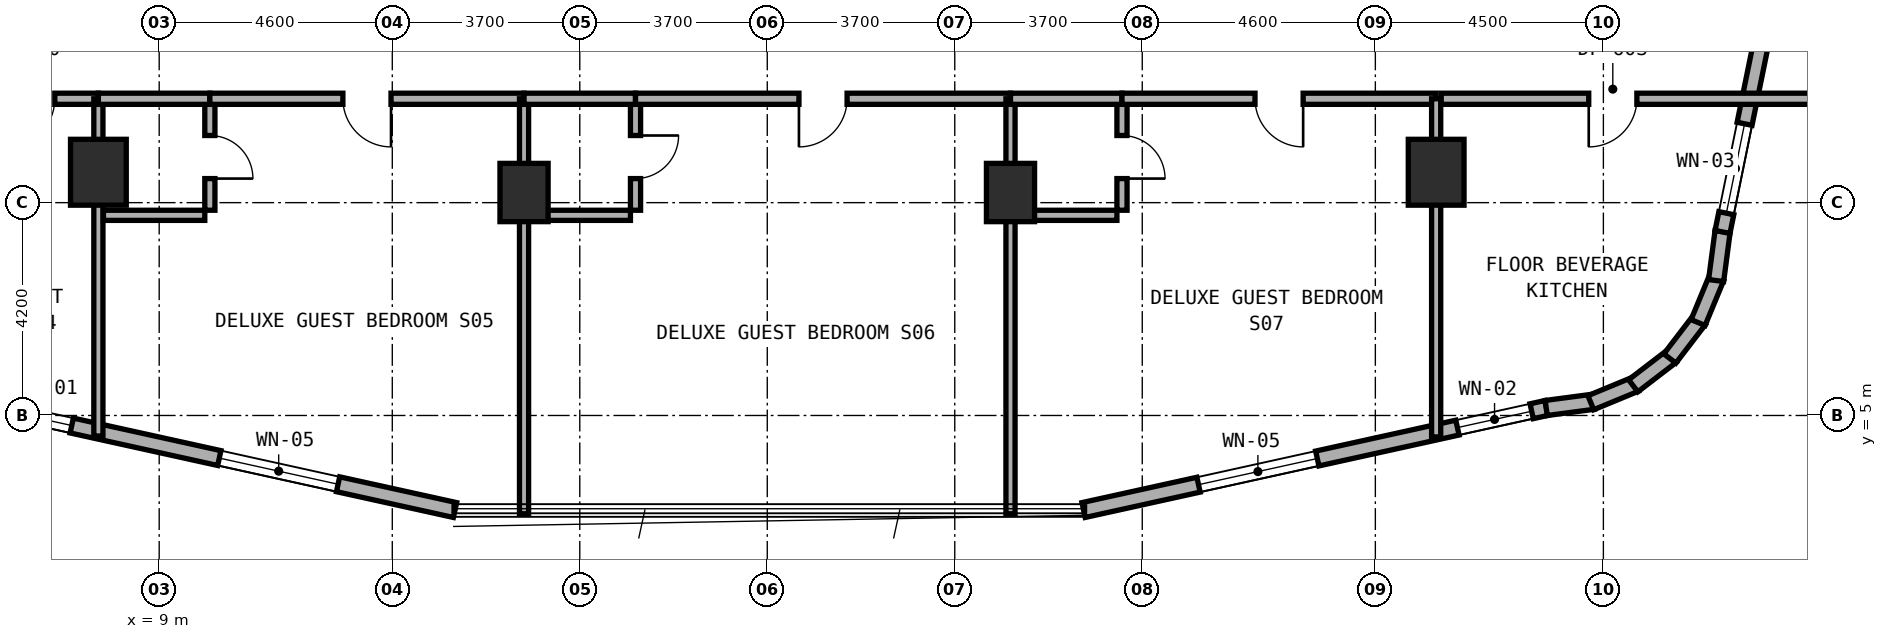
"""IFC4 building model, lengths in metres.
Left out: names, types, materials, properties, quantities, classifications, styles, units other than length and angle.
Written with IfcOpenShell. Run it as: python <this file> out.ifc"""

import sys

from ifc_helpers import new_model, si_unit, direction, frame, frame_2d, origin, origin_2d, place, context, subcontext, project, spatial, rectangle, extrude, element, fill, save


model = new_model("IFC4")
c1 = context("Model", 3, precision=1e-05, world=origin(), true_north=direction((0.0, 1.0)))
c2 = subcontext(c1, "Body", "Model", "MODEL_VIEW")
j1 = project(units=[si_unit("LENGTHUNIT", "METRE"), si_unit("PLANEANGLEUNIT", "RADIAN")], contexts=[c1])
p1 = place(None, origin())
s1 = spatial("IfcSite", under=j1, at=p1, CompositionType="ELEMENT")
p2 = place(p1, origin())
s2 = spatial("IfcBuilding", under=s1, at=p2, CompositionType="ELEMENT")
p3 = place(p2, frame((0.0, 0.0, 31.0)))
s3 = spatial("IfcBuildingStorey", under=s2, at=p3, CompositionType="ELEMENT", Elevation=31.0)
for number, where, z_axis, x_axis in (
    (1, (16.2, 9.4, 0.0), (0.0, 0.0, 1.0), (1.0, 0.0, 0.0)),
    (2, (25.8, 9.4, 0.0), (0.0, 0.0, 1.0), (1.0, 0.0, 0.0)),
):
    element("IfcColumn", number, at=place(p3, frame(where, z_axis=z_axis, x_axis=x_axis)), inside=s3, PredefinedType="COLUMN", context=c2, shape_type="SweptSolid", body=[
        extrude(rectangle(XDim=0.95, YDim=1.15, at=origin_2d()), origin(), (0.0, 0.0, 1.0), 3.5),
    ])
for number, where, z_axis, x_axis in (
    (3, (7.8, 9.8, 0.0), (0.0, 0.0, 1.0), (1.0, 0.0, 0.0)),
    (4, (34.2, 9.8, 0.0), (0.0, 0.0, 1.0), (1.0, 0.0, 0.0)),
):
    element("IfcColumn", number, at=place(p3, frame(where, z_axis=z_axis, x_axis=x_axis)), inside=s3, PredefinedType="COLUMN", context=c2, shape_type="SweptSolid", body=[
        extrude(rectangle(XDim=1.1, YDim=1.3, at=origin_2d()), origin(), (0.0, 0.0, 1.0), 3.5),
    ])
p4 = place(p3, frame((5.704, 5.148, 0.0), z_axis=(0.0, 0.0, 1.0), x_axis=(0.9765437942, -0.215318875183, 0.0)))
e5 = element("IfcWall", 5, at=p4, inside=s3, PredefinedType="STANDARD", context=c2, shape_type="SweptSolid", body=[
    extrude(rectangle(XDim=9.353, YDim=0.3, at=frame_2d((4.677, 0.0))), origin(), (0.0, 0.0, 1.0), 3.22),
])
p5 = place(p4, frame((0.408, 0.0, 0.85)))
e6 = element("IfcOpeningElement", 6, at=p5, cuts=e5, PredefinedType="OPENING", context=c2, shape_type="SweptSolid", body=[
    extrude(rectangle(XDim=1.2, YDim=1.5, at=frame_2d((0.6, 0.75))), frame((0.0, 0.16, 0.0), z_axis=(0.0, -1.0, 0.0), x_axis=(1.0, 0.0, 0.0)), (0.0, 0.0, 1.0), 0.32),
])
p6 = place(p4, frame((4.59, 0.0, 0.8)))
e7 = element("IfcOpeningElement", 7, at=p6, cuts=e5, PredefinedType="OPENING", context=c2, shape_type="SweptSolid", body=[
    extrude(rectangle(XDim=2.4, YDim=1.6, at=frame_2d((1.2, 0.8))), frame((0.0, 0.16, 0.0), z_axis=(0.0, -1.0, 0.0), x_axis=(1.0, 0.0, 0.0)), (0.0, 0.0, 1.0), 0.32),
])
p7 = place(p3, frame((27.242, 3.134, 0.0), z_axis=(0.0, 0.0, 1.0), x_axis=(0.97654500432, 0.215313386808, 0.0)))
e8 = element("IfcWall", 8, at=p7, inside=s3, PredefinedType="STANDARD", context=c2, shape_type="SweptSolid", body=[
    extrude(rectangle(XDim=9.354, YDim=0.3, at=frame_2d((4.677, 0.0))), origin(), (0.0, 0.0, 1.0), 3.22),
])
p8 = place(p7, frame((2.323, 0.0, 0.8)))
e9 = element("IfcOpeningElement", 9, at=p8, cuts=e8, PredefinedType="OPENING", context=c2, shape_type="SweptSolid", body=[
    extrude(rectangle(XDim=2.4, YDim=1.6, at=frame_2d((1.2, 0.8))), frame((0.0, 0.16, 0.0), z_axis=(0.0, -1.0, 0.0), x_axis=(1.0, 0.0, 0.0)), (0.0, 0.0, 1.0), 0.32),
])
p9 = place(p7, frame((7.555, 0.0, 0.85)))
e10 = element("IfcOpeningElement", 10, at=p9, cuts=e8, PredefinedType="OPENING", context=c2, shape_type="SweptSolid", body=[
    extrude(rectangle(XDim=1.5, YDim=1.5, at=frame_2d((0.75, 0.75))), frame((0.0, 0.16, 0.0), z_axis=(0.0, -1.0, 0.0), x_axis=(1.0, 0.0, 0.0)), (0.0, 0.0, 1.0), 0.32),
])
p10 = place(p3, frame((36.372, 5.148, 0.0), z_axis=(0.0, 0.0, 1.0), x_axis=(0.991359246108, 0.131174864804, 0.0)))
e11 = element("IfcWall", 11, at=p10, inside=s3, PredefinedType="STANDARD", context=c2, shape_type="SweptSolid", body=[
    extrude(rectangle(XDim=0.938, YDim=0.3, at=frame_2d((0.469, 0.0))), origin(), (0.0, 0.0, 1.0), 3.22),
])
p11 = place(p3, frame((37.252, 5.252, 0.0), z_axis=(0.0, 0.0, 1.0), x_axis=(0.924019948111, 0.382344263057, 0.0)))
e12 = element("IfcWall", 12, at=p11, inside=s3, PredefinedType="STANDARD", context=c2, shape_type="SweptSolid", body=[
    extrude(rectangle(XDim=0.955, YDim=0.3, at=frame_2d((0.477, 0.0))), origin(), (0.0, 0.0, 1.0), 3.22),
])
p12 = place(p3, frame((38.089, 5.586, 0.0), z_axis=(0.0, 0.0, 1.0), x_axis=(0.793573440799, 0.608474481025, 0.0)))
e13 = element("IfcWall", 13, at=p12, inside=s3, PredefinedType="STANDARD", context=c2, shape_type="SweptSolid", body=[
    extrude(rectangle(XDim=0.955, YDim=0.3, at=frame_2d((0.478, 0.0))), origin(), (0.0, 0.0, 1.0), 3.22),
])
p13 = place(p3, frame((38.812, 6.125, 0.0), z_axis=(0.0, 0.0, 1.0), x_axis=(0.608351047625, 0.793668068435, 0.0)))
e14 = element("IfcWall", 14, at=p13, inside=s3, PredefinedType="STANDARD", context=c2, shape_type="SweptSolid", body=[
    extrude(rectangle(XDim=0.955, YDim=0.3, at=frame_2d((0.478, 0.0))), origin(), (0.0, 0.0, 1.0), 3.22),
])
p14 = place(p3, frame((39.369, 6.834, 0.0), z_axis=(0.0, 0.0, 1.0), x_axis=(0.382344263057, 0.924019948111, 0.0)))
e15 = element("IfcWall", 15, at=p14, inside=s3, PredefinedType="STANDARD", context=c2, shape_type="SweptSolid", body=[
    extrude(rectangle(XDim=0.955, YDim=0.3, at=frame_2d((0.477, 0.0))), origin(), (0.0, 0.0, 1.0), 3.22),
])
p15 = place(p3, frame((39.725, 7.663, 0.0), z_axis=(0.0, 0.0, 1.0), x_axis=(0.130454512571, 0.991454295543, 0.0)))
e16 = element("IfcWall", 16, at=p15, inside=s3, PredefinedType="STANDARD", context=c2, shape_type="SweptSolid", body=[
    extrude(rectangle(XDim=0.973, YDim=0.3, at=frame_2d((0.487, 0.0))), origin(), (0.0, 0.0, 1.0), 3.22),
])
p16 = place(p3, frame((39.851, 8.622, 0.0), z_axis=(0.0, 0.0, 1.0), x_axis=(0.199990901713, 0.979797754249, 0.0)))
e17 = element("IfcWall", 17, at=p16, inside=s3, PredefinedType="STANDARD", context=c2, shape_type="SweptSolid", body=[
    extrude(rectangle(XDim=10.065, YDim=0.3, at=frame_2d((5.033, 0.0))), origin(), (0.0, 0.0, 1.0), 3.22),
])
p17 = place(p16, frame((0.378, 0.0, 0.85)))
e18 = element("IfcOpeningElement", 18, at=p17, cuts=e17, PredefinedType="OPENING", context=c2, shape_type="SweptSolid", body=[
    extrude(rectangle(XDim=1.8, YDim=1.5, at=frame_2d((0.9, 0.75))), frame((0.0, 0.16, 0.0), z_axis=(0.0, -1.0, 0.0), x_axis=(1.0, 0.0, 0.0)), (0.0, 0.0, 1.0), 0.32),
])
p18 = place(p16, frame((5.236, 0.0, 0.8)))
e19 = element("IfcOpeningElement", 19, at=p18, cuts=e17, PredefinedType="OPENING", context=c2, shape_type="SweptSolid", body=[
    extrude(rectangle(XDim=2.4, YDim=1.6, at=frame_2d((1.2, 0.8))), frame((0.0, 0.16, 0.0), z_axis=(0.0, -1.0, 0.0), x_axis=(1.0, 0.0, 0.0)), (0.0, 0.0, 1.0), 0.32),
])
p19 = place(p3, frame((5.55, 11.25, 0.0), z_axis=(0.0, 0.0, 1.0), x_axis=(1.0, 0.0, 0.0)))
e20 = element("IfcWall", 20, at=p19, inside=s3, PredefinedType="SOLIDWALL", context=c2, shape_type="SweptSolid", body=[
    extrude(rectangle(XDim=2.25, YDim=0.22, at=frame_2d((1.125, 0.0))), origin(), (0.0, 0.0, 1.0), 2.395),
])
p20 = place(p19, frame((0.44, 0.0, 0.0)))
e21 = element("IfcOpeningElement", 21, at=p20, cuts=e20, PredefinedType="OPENING", context=c2, shape_type="SweptSolid", body=[
    extrude(rectangle(XDim=0.95, YDim=2.1, at=frame_2d((0.475, 1.05))), frame((0.0, 0.12, 0.0), z_axis=(0.0, -1.0, 0.0), x_axis=(1.0, 0.0, 0.0)), (0.0, 0.0, 1.0), 0.24),
])
p21 = place(p3, frame((7.8, 4.594, 0.0), z_axis=(0.0, 0.0, 1.0), x_axis=(0.0, 1.0, 0.0)))
e22 = element("IfcWall", 22, at=p21, inside=s3, PredefinedType="SOLIDWALL", context=c2, shape_type="SweptSolid", body=[
    extrude(rectangle(XDim=6.656, YDim=0.18, at=frame_2d((3.328, 0.0))), origin(), (0.0, 0.0, 1.0), 2.395),
])
p22 = place(p3, frame((10.0, 9.05, 0.0), z_axis=(0.0, 0.0, 1.0), x_axis=(0.0, 1.0, 0.0)))
e23 = element("IfcWall", 23, at=p22, inside=s3, PredefinedType="PLUMBINGWALL", context=c2, shape_type="SweptSolid", body=[
    extrude(rectangle(XDim=2.1, YDim=0.2, at=frame_2d((1.05, 0.0))), origin(), (0.0, 0.0, 1.0), 2.745),
])
p23 = place(p22, frame((0.625, 0.0, 0.0)))
e24 = element("IfcOpeningElement", 24, at=p23, cuts=e23, PredefinedType="OPENING", context=c2, shape_type="SweptSolid", body=[
    extrude(rectangle(XDim=0.85, YDim=2.1, at=frame_2d((0.425, 1.05))), frame((0.0, 0.11, 0.0), z_axis=(0.0, -1.0, 0.0), x_axis=(1.0, 0.0, 0.0)), (0.0, 0.0, 1.0), 0.22),
])
p24 = place(p3, frame((7.9, 8.95, 0.0), z_axis=(0.0, 0.0, 1.0), x_axis=(1.0, 0.0, 0.0)))
e25 = element("IfcWall", 25, at=p24, inside=s3, PredefinedType="PLUMBINGWALL", context=c2, shape_type="SweptSolid", body=[
    extrude(rectangle(XDim=2.0, YDim=0.2, at=frame_2d((1.0, 0.0))), origin(), (0.0, 0.0, 1.0), 3.22),
])
p25 = place(p3, frame((7.8, 11.25, 0.0), z_axis=(0.0, 0.0, 1.0), x_axis=(1.0, 0.0, 0.0)))
e26 = element("IfcWall", 26, at=p25, inside=s3, PredefinedType="SOLIDWALL", context=c2, shape_type="SweptSolid", body=[
    extrude(rectangle(XDim=2.2, YDim=0.22, at=frame_2d((1.1, 0.0))), origin(), (0.0, 0.0, 1.0), 2.395),
])
p26 = place(p3, frame((10.0, 11.25, 0.0), z_axis=(0.0, 0.0, 1.0), x_axis=(1.0, 0.0, 0.0)))
e27 = element("IfcWall", 27, at=p26, inside=s3, PredefinedType="SOLIDWALL", context=c2, shape_type="SweptSolid", body=[
    extrude(rectangle(XDim=6.2, YDim=0.22, at=frame_2d((3.1, 0.0))), origin(), (0.0, 0.0, 1.0), 2.395),
])
p27 = place(p26, frame((2.625, 0.0, 0.0)))
e28 = element("IfcOpeningElement", 28, at=p27, cuts=e27, PredefinedType="OPENING", context=c2, shape_type="SweptSolid", body=[
    extrude(rectangle(XDim=0.95, YDim=2.1, at=frame_2d((0.475, 1.05))), frame((0.0, 0.12, 0.0), z_axis=(0.0, -1.0, 0.0), x_axis=(1.0, 0.0, 0.0)), (0.0, 0.0, 1.0), 0.24),
])
p28 = place(p3, frame((16.2, 3.06, 0.0), z_axis=(0.0, 0.0, 1.0), x_axis=(0.0, 1.0, 0.0)))
e29 = element("IfcWall", 29, at=p28, inside=s3, PredefinedType="SOLIDWALL", context=c2, shape_type="SweptSolid", body=[
    extrude(rectangle(XDim=8.19, YDim=0.18, at=frame_2d((4.095, 0.0))), origin(), (0.0, 0.0, 1.0), 2.395),
])
p29 = place(p3, frame((18.4, 9.05, 0.0), z_axis=(0.0, 0.0, 1.0), x_axis=(0.0, 1.0, 0.0)))
e30 = element("IfcWall", 30, at=p29, inside=s3, PredefinedType="PLUMBINGWALL", context=c2, shape_type="SweptSolid", body=[
    extrude(rectangle(XDim=2.1, YDim=0.2, at=frame_2d((1.05, 0.0))), origin(), (0.0, 0.0, 1.0), 2.745),
])
p30 = place(p29, frame((0.625, 0.0, 0.0)))
e31 = element("IfcOpeningElement", 31, at=p30, cuts=e30, PredefinedType="OPENING", context=c2, shape_type="SweptSolid", body=[
    extrude(rectangle(XDim=0.85, YDim=2.1, at=frame_2d((0.425, 1.05))), frame((0.0, 0.11, 0.0), z_axis=(0.0, -1.0, 0.0), x_axis=(1.0, 0.0, 0.0)), (0.0, 0.0, 1.0), 0.22),
])
p31 = place(p3, frame((16.3, 8.95, 0.0), z_axis=(0.0, 0.0, 1.0), x_axis=(1.0, 0.0, 0.0)))
e32 = element("IfcWall", 32, at=p31, inside=s3, PredefinedType="PLUMBINGWALL", context=c2, shape_type="SweptSolid", body=[
    extrude(rectangle(XDim=2.0, YDim=0.2, at=frame_2d((1.0, 0.0))), origin(), (0.0, 0.0, 1.0), 3.22),
])
p32 = place(p3, frame((16.2, 11.25, 0.0), z_axis=(0.0, 0.0, 1.0), x_axis=(1.0, 0.0, 0.0)))
e33 = element("IfcWall", 33, at=p32, inside=s3, PredefinedType="SOLIDWALL", context=c2, shape_type="SweptSolid", body=[
    extrude(rectangle(XDim=2.2, YDim=0.22, at=frame_2d((1.1, 0.0))), origin(), (0.0, 0.0, 1.0), 2.395),
])
p33 = place(p3, frame((18.4, 11.25, 0.0), z_axis=(0.0, 0.0, 1.0), x_axis=(1.0, 0.0, 0.0)))
e34 = element("IfcWall", 34, at=p33, inside=s3, PredefinedType="SOLIDWALL", context=c2, shape_type="SweptSolid", body=[
    extrude(rectangle(XDim=7.4, YDim=0.22, at=frame_2d((3.7, 0.0))), origin(), (0.0, 0.0, 1.0), 2.395),
])
p34 = place(p33, frame((3.225, 0.0, 0.0)))
e35 = element("IfcOpeningElement", 35, at=p34, cuts=e34, PredefinedType="OPENING", context=c2, shape_type="SweptSolid", body=[
    extrude(rectangle(XDim=0.95, YDim=2.1, at=frame_2d((0.475, 1.05))), frame((0.0, 0.12, 0.0), z_axis=(0.0, -1.0, 0.0), x_axis=(1.0, 0.0, 0.0)), (0.0, 0.0, 1.0), 0.24),
])
p35 = place(p3, frame((25.8, 3.06, 0.0), z_axis=(0.0, 0.0, 1.0), x_axis=(0.0, 1.0, 0.0)))
e36 = element("IfcWall", 36, at=p35, inside=s3, PredefinedType="SOLIDWALL", context=c2, shape_type="SweptSolid", body=[
    extrude(rectangle(XDim=8.19, YDim=0.18, at=frame_2d((4.095, 0.0))), origin(), (0.0, 0.0, 1.0), 2.395),
])
p36 = place(p3, frame((28.0, 9.05, 0.0), z_axis=(0.0, 0.0, 1.0), x_axis=(0.0, 1.0, 0.0)))
e37 = element("IfcWall", 37, at=p36, inside=s3, PredefinedType="PLUMBINGWALL", context=c2, shape_type="SweptSolid", body=[
    extrude(rectangle(XDim=2.1, YDim=0.2, at=frame_2d((1.05, 0.0))), origin(), (0.0, 0.0, 1.0), 2.745),
])
p37 = place(p36, frame((0.625, 0.0, 0.0)))
e38 = element("IfcOpeningElement", 38, at=p37, cuts=e37, PredefinedType="OPENING", context=c2, shape_type="SweptSolid", body=[
    extrude(rectangle(XDim=0.85, YDim=2.1, at=frame_2d((0.425, 1.05))), frame((0.0, 0.11, 0.0), z_axis=(0.0, -1.0, 0.0), x_axis=(1.0, 0.0, 0.0)), (0.0, 0.0, 1.0), 0.22),
])
p38 = place(p3, frame((25.9, 8.95, 0.0), z_axis=(0.0, 0.0, 1.0), x_axis=(1.0, 0.0, 0.0)))
e39 = element("IfcWall", 39, at=p38, inside=s3, PredefinedType="PLUMBINGWALL", context=c2, shape_type="SweptSolid", body=[
    extrude(rectangle(XDim=2.0, YDim=0.2, at=frame_2d((1.0, 0.0))), origin(), (0.0, 0.0, 1.0), 3.22),
])
p39 = place(p3, frame((25.8, 11.25, 0.0), z_axis=(0.0, 0.0, 1.0), x_axis=(1.0, 0.0, 0.0)))
e40 = element("IfcWall", 40, at=p39, inside=s3, PredefinedType="SOLIDWALL", context=c2, shape_type="SweptSolid", body=[
    extrude(rectangle(XDim=2.2, YDim=0.22, at=frame_2d((1.1, 0.0))), origin(), (0.0, 0.0, 1.0), 2.395),
])
p40 = place(p3, frame((28.0, 11.25, 0.0), z_axis=(0.0, 0.0, 1.0), x_axis=(1.0, 0.0, 0.0)))
e41 = element("IfcWall", 41, at=p40, inside=s3, PredefinedType="SOLIDWALL", context=c2, shape_type="SweptSolid", body=[
    extrude(rectangle(XDim=6.2, YDim=0.22, at=frame_2d((3.1, 0.0))), origin(), (0.0, 0.0, 1.0), 2.395),
])
p41 = place(p40, frame((2.625, 0.0, 0.0)))
e42 = element("IfcOpeningElement", 42, at=p41, cuts=e41, PredefinedType="OPENING", context=c2, shape_type="SweptSolid", body=[
    extrude(rectangle(XDim=0.95, YDim=2.1, at=frame_2d((0.475, 1.05))), frame((0.0, 0.12, 0.0), z_axis=(0.0, -1.0, 0.0), x_axis=(1.0, 0.0, 0.0)), (0.0, 0.0, 1.0), 0.24),
])
p42 = place(p3, frame((34.2, 4.576, 0.0), z_axis=(0.0, 0.0, 1.0), x_axis=(0.0, 1.0, 0.0)))
e43 = element("IfcWall", 43, at=p42, inside=s3, PredefinedType="SOLIDWALL", context=c2, shape_type="SweptSolid", body=[
    extrude(rectangle(XDim=6.674, YDim=0.18, at=frame_2d((3.337, 0.0))), origin(), (0.0, 0.0, 1.0), 2.395),
])
p43 = place(p3, frame((34.3, 11.25, 0.0), z_axis=(0.0, 0.0, 1.0), x_axis=(1.0, 0.0, 0.0)))
e44 = element("IfcWall", 44, at=p43, inside=s3, PredefinedType="SOLIDWALL", context=c2, shape_type="SweptSolid", body=[
    extrude(rectangle(XDim=7.44, YDim=0.22, at=frame_2d((3.72, 0.0))), origin(), (0.0, 0.0, 1.0), 2.745),
])
p44 = place(p43, frame((2.911, 0.0, 0.0)))
e45 = element("IfcOpeningElement", 45, at=p44, cuts=e44, PredefinedType="OPENING", context=c2, shape_type="SweptSolid", body=[
    extrude(rectangle(XDim=0.95, YDim=2.1, at=frame_2d((0.475, 1.05))), frame((0.0, 0.12, 0.0), z_axis=(0.0, -1.0, 0.0), x_axis=(1.0, 0.0, 0.0)), (0.0, 0.0, 1.0), 0.24),
])
p45 = place(p5, origin())
e46 = element("IfcWindow", 46, at=p45, inside=s3, PartitioningType="SINGLE_PANEL", PredefinedType="WINDOW", context=c2, shape_type="SweptSolid", body=[
    extrude(rectangle(XDim=1.2, YDim=1.5, at=frame_2d((0.6, 0.75))), frame((0.0, 0.03, 0.0), z_axis=(0.0, -1.0, 0.0), x_axis=(1.0, 0.0, 0.0)), (0.0, 0.0, 1.0), 0.06),
])
fill(e6, e46)
p46 = place(p6, origin())
e47 = element("IfcWindow", 47, at=p46, inside=s3, PartitioningType="SINGLE_PANEL", PredefinedType="WINDOW", context=c2, shape_type="SweptSolid", body=[
    extrude(rectangle(XDim=2.4, YDim=1.6, at=frame_2d((1.2, 0.8))), frame((0.0, 0.03, 0.0), z_axis=(0.0, -1.0, 0.0), x_axis=(1.0, 0.0, 0.0)), (0.0, 0.0, 1.0), 0.06),
])
fill(e7, e47)
p47 = place(p8, origin())
e48 = element("IfcWindow", 48, at=p47, inside=s3, PartitioningType="SINGLE_PANEL", PredefinedType="WINDOW", context=c2, shape_type="SweptSolid", body=[
    extrude(rectangle(XDim=2.4, YDim=1.6, at=frame_2d((1.2, 0.8))), frame((0.0, 0.03, 0.0), z_axis=(0.0, -1.0, 0.0), x_axis=(1.0, 0.0, 0.0)), (0.0, 0.0, 1.0), 0.06),
])
fill(e9, e48)
p48 = place(p9, origin())
e49 = element("IfcWindow", 49, at=p48, inside=s3, PartitioningType="SINGLE_PANEL", PredefinedType="WINDOW", context=c2, shape_type="SweptSolid", body=[
    extrude(rectangle(XDim=1.5, YDim=1.5, at=frame_2d((0.75, 0.75))), frame((0.0, 0.03, 0.0), z_axis=(0.0, -1.0, 0.0), x_axis=(1.0, 0.0, 0.0)), (0.0, 0.0, 1.0), 0.06),
])
fill(e10, e49)
p49 = place(p17, origin())
e50 = element("IfcWindow", 50, at=p49, inside=s3, PartitioningType="SINGLE_PANEL", PredefinedType="WINDOW", context=c2, shape_type="SweptSolid", body=[
    extrude(rectangle(XDim=1.8, YDim=1.5, at=frame_2d((0.9, 0.75))), frame((0.0, 0.03, 0.0), z_axis=(0.0, -1.0, 0.0), x_axis=(1.0, 0.0, 0.0)), (0.0, 0.0, 1.0), 0.06),
])
fill(e18, e50)
p50 = place(p20, frame((0.95, 0.0, 0.0), z_axis=(0.0, 0.0, 1.0), x_axis=(-1.0, 0.0, 0.0)))
e51 = element("IfcDoor", 51, at=p50, inside=s3, OperationType="SINGLE_SWING_RIGHT", PredefinedType="DOOR", context=c2, shape_type="SweptSolid", body=[
    extrude(rectangle(XDim=0.95, YDim=2.1, at=frame_2d((0.475, 1.05))), frame((0.0, 0.025, 0.0), z_axis=(0.0, -1.0, 0.0), x_axis=(1.0, 0.0, 0.0)), (0.0, 0.0, 1.0), 0.05),
])
fill(e21, e51)
p51 = place(p23, frame((0.85, 0.0, 0.0), z_axis=(0.0, 0.0, 1.0), x_axis=(-1.0, 0.0, 0.0)))
e52 = element("IfcDoor", 52, at=p51, inside=s3, OperationType="SINGLE_SWING_RIGHT", PredefinedType="DOOR", context=c2, shape_type="SweptSolid", body=[
    extrude(rectangle(XDim=0.85, YDim=2.1, at=frame_2d((0.425, 1.05))), frame((0.0, 0.025, 0.0), z_axis=(0.0, -1.0, 0.0), x_axis=(1.0, 0.0, 0.0)), (0.0, 0.0, 1.0), 0.05),
])
fill(e24, e52)
p52 = place(p27, frame((0.95, 0.0, 0.0), z_axis=(0.0, 0.0, 1.0), x_axis=(-1.0, 0.0, 0.0)))
e53 = element("IfcDoor", 53, at=p52, inside=s3, OperationType="SINGLE_SWING_LEFT", PredefinedType="DOOR", context=c2, shape_type="SweptSolid", body=[
    extrude(rectangle(XDim=0.95, YDim=2.1, at=frame_2d((0.475, 1.05))), frame((0.0, 0.025, 0.0), z_axis=(0.0, -1.0, 0.0), x_axis=(1.0, 0.0, 0.0)), (0.0, 0.0, 1.0), 0.05),
])
fill(e28, e53)
p53 = place(p30, frame((0.85, 0.0, 0.0), z_axis=(0.0, 0.0, 1.0), x_axis=(-1.0, 0.0, 0.0)))
e54 = element("IfcDoor", 54, at=p53, inside=s3, OperationType="SINGLE_SWING_LEFT", PredefinedType="DOOR", context=c2, shape_type="SweptSolid", body=[
    extrude(rectangle(XDim=0.85, YDim=2.1, at=frame_2d((0.425, 1.05))), frame((0.0, 0.025, 0.0), z_axis=(0.0, -1.0, 0.0), x_axis=(1.0, 0.0, 0.0)), (0.0, 0.0, 1.0), 0.05),
])
fill(e31, e54)
p54 = place(p34, frame((0.95, 0.0, 0.0), z_axis=(0.0, 0.0, 1.0), x_axis=(-1.0, 0.0, 0.0)))
e55 = element("IfcDoor", 55, at=p54, inside=s3, OperationType="SINGLE_SWING_RIGHT", PredefinedType="DOOR", context=c2, shape_type="SweptSolid", body=[
    extrude(rectangle(XDim=0.95, YDim=2.1, at=frame_2d((0.475, 1.05))), frame((0.0, 0.025, 0.0), z_axis=(0.0, -1.0, 0.0), x_axis=(1.0, 0.0, 0.0)), (0.0, 0.0, 1.0), 0.05),
])
fill(e35, e55)
p55 = place(p37, frame((0.85, 0.0, 0.0), z_axis=(0.0, 0.0, 1.0), x_axis=(-1.0, 0.0, 0.0)))
e56 = element("IfcDoor", 56, at=p55, inside=s3, OperationType="SINGLE_SWING_RIGHT", PredefinedType="DOOR", context=c2, shape_type="SweptSolid", body=[
    extrude(rectangle(XDim=0.85, YDim=2.1, at=frame_2d((0.425, 1.05))), frame((0.0, 0.025, 0.0), z_axis=(0.0, -1.0, 0.0), x_axis=(1.0, 0.0, 0.0)), (0.0, 0.0, 1.0), 0.05),
])
fill(e38, e56)
p56 = place(p41, frame((0.95, 0.0, 0.0), z_axis=(0.0, 0.0, 1.0), x_axis=(-1.0, 0.0, 0.0)))
e57 = element("IfcDoor", 57, at=p56, inside=s3, OperationType="SINGLE_SWING_LEFT", PredefinedType="DOOR", context=c2, shape_type="SweptSolid", body=[
    extrude(rectangle(XDim=0.95, YDim=2.1, at=frame_2d((0.475, 1.05))), frame((0.0, 0.025, 0.0), z_axis=(0.0, -1.0, 0.0), x_axis=(1.0, 0.0, 0.0)), (0.0, 0.0, 1.0), 0.05),
])
fill(e42, e57)
p57 = place(p44, frame((0.95, 0.0, 0.0), z_axis=(0.0, 0.0, 1.0), x_axis=(-1.0, 0.0, 0.0)))
e58 = element("IfcDoor", 58, at=p57, inside=s3, OperationType="SINGLE_SWING_RIGHT", PredefinedType="DOOR", context=c2, shape_type="SweptSolid", body=[
    extrude(rectangle(XDim=0.95, YDim=2.1, at=frame_2d((0.475, 1.05))), frame((0.0, 0.025, 0.0), z_axis=(0.0, -1.0, 0.0), x_axis=(1.0, 0.0, 0.0)), (0.0, 0.0, 1.0), 0.05),
])
fill(e45, e58)
save(model, sys.argv[1])
